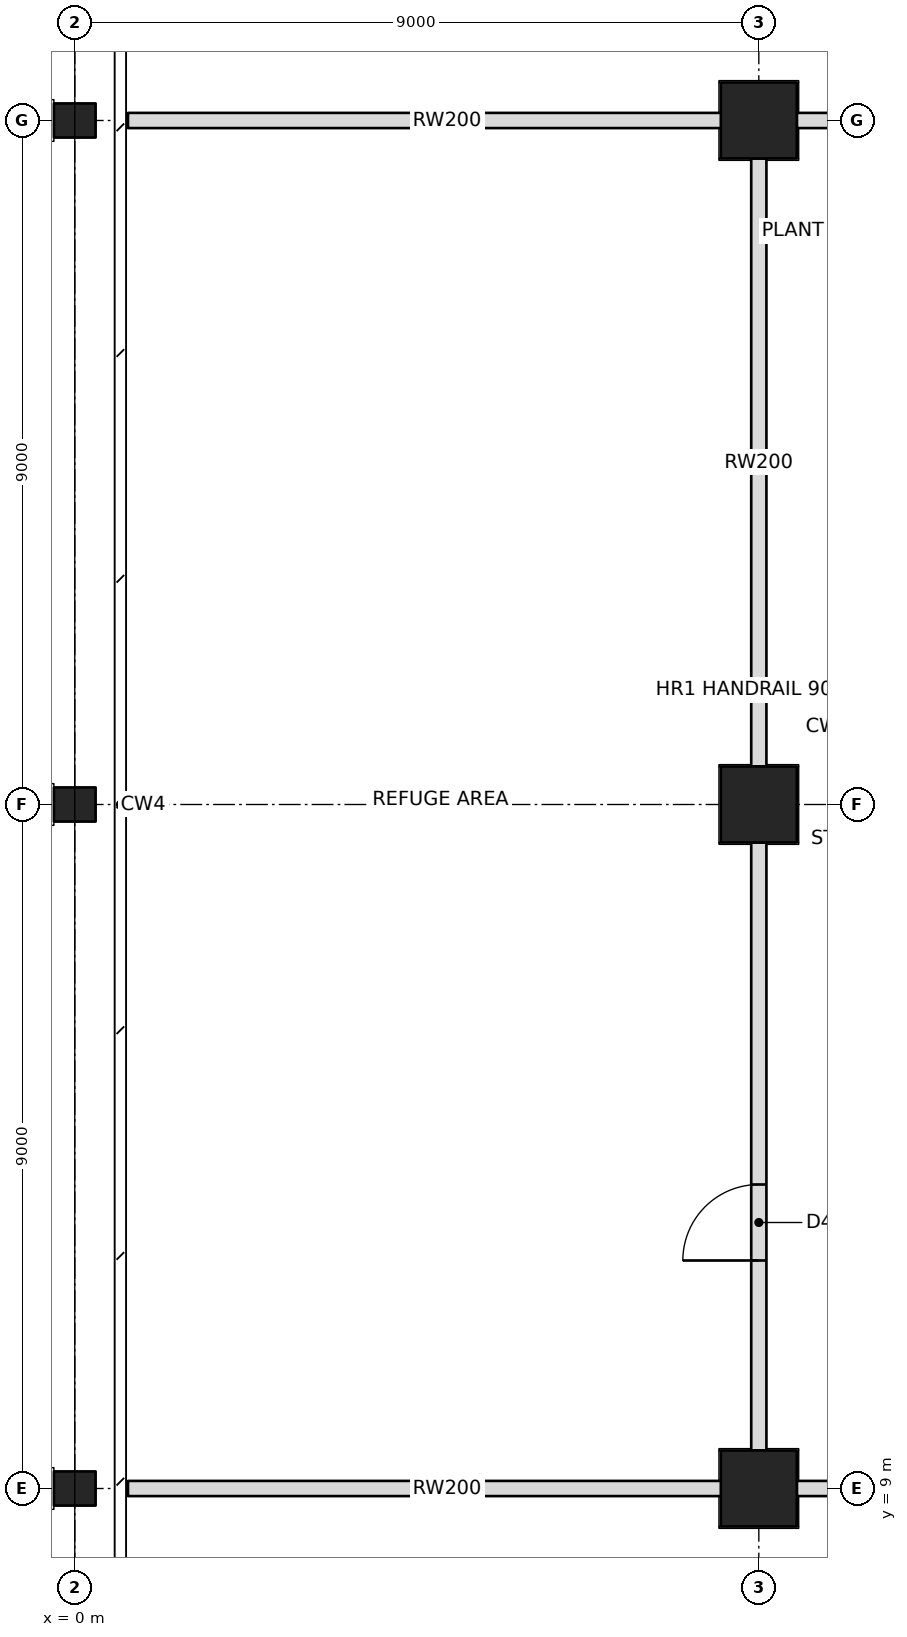
"""IFC4 building model, lengths in metres.
Left out: names, types, materials, properties, quantities, classifications, styles, units other than length and angle.
Written with IfcOpenShell. Run it as: python <this file> out.ifc"""

import sys

from ifc_helpers import new_model, si_unit, direction, frame, frame_2d, origin, origin_2d, place, context, subcontext, project, spatial, rectangle, hollow_rectangle, i_section, extrude, element, fill, save


model = new_model("IFC4")
c1 = context("Model", 3, precision=1e-05, world=origin(), true_north=direction((0.0, 1.0)))
c2 = subcontext(c1, "Body", "Model", "MODEL_VIEW")
j1 = project(units=[si_unit("LENGTHUNIT", "METRE"), si_unit("PLANEANGLEUNIT", "RADIAN")], contexts=[c1])
p1 = place(None, origin())
s1 = spatial("IfcSite", under=j1, at=p1, CompositionType="ELEMENT")
p2 = place(p1, origin())
s2 = spatial("IfcBuilding", under=s1, at=p2, CompositionType="ELEMENT")
p3 = place(p2, frame((0.0, 0.0, 89.2)))
s3 = spatial("IfcBuildingStorey", under=s2, at=p3, CompositionType="ELEMENT", Elevation=89.2)
for number, where, z_axis, x_axis in (
    (1, (0.0, 9.0, 0.0), (0.0, 0.0, 1.0), (0.0, 1.0, 0.0)),
    (2, (0.0, 18.0, 0.0), (0.0, 0.0, 1.0), (0.0, 1.0, 0.0)),
    (3, (0.0, 27.0, 0.0), (0.0, 0.0, 1.0), (0.0, 1.0, 0.0)),
):
    element("IfcColumn", number, at=place(p3, frame(where, z_axis=z_axis, x_axis=x_axis)), inside=s3, PredefinedType="COLUMN", context=c2, shape_type="SweptSolid", body=[
        extrude(i_section(OverallWidth=0.449, OverallDepth=0.549, WebThickness=0.072, FlangeThickness=0.115, at=origin_2d()), origin(), (0.0, 0.0, 1.0), 5.0),
    ])
for number, where, z_axis, x_axis in (
    (4, (9.0, 9.0, 0.0), (0.0, 0.0, 1.0), (1.0, 0.0, 0.0)),
    (5, (9.0, 18.0, 0.0), (0.0, 0.0, 1.0), (1.0, 0.0, 0.0)),
    (6, (9.0, 27.0, 0.0), (0.0, 0.0, 1.0), (1.0, 0.0, 0.0)),
):
    element("IfcColumn", number, at=place(p3, frame(where, z_axis=z_axis, x_axis=x_axis)), inside=s3, PredefinedType="COLUMN", context=c2, shape_type="SweptSolid", body=[
        extrude(hollow_rectangle(XDim=1.0, YDim=1.0, WallThickness=0.1, at=origin_2d()), origin(), (0.0, 0.0, 1.0), 5.0),
    ])
p4 = place(p3, frame((9.0, 9.5, 0.0), z_axis=(0.0, 0.0, 1.0), x_axis=(0.0, 1.0, 0.0)))
e7 = element("IfcWall", 7, at=p4, inside=s3, PredefinedType="PARTITIONING", context=c2, shape_type="SweptSolid", body=[
    extrude(rectangle(XDim=8.0, YDim=0.2, at=frame_2d((4.0, 0.0))), origin(), (0.0, 0.0, 1.0), 4.005),
])
p5 = place(p4, frame((2.5, 0.0, 0.0)))
e8 = element("IfcOpeningElement", 8, at=p5, cuts=e7, PredefinedType="OPENING", context=c2, shape_type="SweptSolid", body=[
    extrude(rectangle(XDim=1.0, YDim=2.1, at=frame_2d((0.5, 1.05))), frame((0.0, 0.11, 0.0), z_axis=(0.0, -1.0, 0.0), x_axis=(1.0, 0.0, 0.0)), (0.0, 0.0, 1.0), 0.22),
])
p6 = place(p3, frame((9.0, 18.5, 0.0), z_axis=(0.0, 0.0, 1.0), x_axis=(0.0, 1.0, 0.0)))
e9 = element("IfcWall", 9, at=p6, inside=s3, PredefinedType="PARTITIONING", context=c2, shape_type="SweptSolid", body=[
    extrude(rectangle(XDim=8.0, YDim=0.2, at=frame_2d((4.0, 0.0))), origin(), (0.0, 0.0, 1.0), 4.005),
])
for number, where, z_axis, x_axis in (
    (10, (0.7, 9.0, 0.0), (0.0, 0.0, 1.0), (1.0, 0.0, 0.0)),
    (11, (0.7, 27.0, 0.0), (0.0, 0.0, 1.0), (1.0, 0.0, 0.0)),
):
    element("IfcWall", number, at=place(p3, frame(where, z_axis=z_axis, x_axis=x_axis)), inside=s3, PredefinedType="PARTITIONING", context=c2, shape_type="SweptSolid", body=[
        extrude(rectangle(XDim=8.4, YDim=0.2, at=frame_2d((4.2, 0.0))), origin(), (0.0, 0.0, 1.0), 4.005),
    ])
p7 = place(p3, frame((9.5, 9.0, 0.0), z_axis=(0.0, 0.0, 1.0), x_axis=(1.0, 0.0, 0.0)))
e12 = element("IfcWall", 12, at=p7, inside=s3, PredefinedType="PARTITIONING", context=c2, shape_type="SweptSolid", body=[
    extrude(rectangle(XDim=8.0, YDim=0.2, at=frame_2d((4.0, 0.0))), origin(), (0.0, 0.0, 1.0), 4.005),
])
p8 = place(p7, frame((1.5, 0.0, 0.0)))
e13 = element("IfcOpeningElement", 13, at=p8, cuts=e12, PredefinedType="OPENING", context=c2, shape_type="SweptSolid", body=[
    extrude(rectangle(XDim=1.0, YDim=2.1, at=frame_2d((0.5, 1.05))), frame((0.0, 0.11, 0.0), z_axis=(0.0, -1.0, 0.0), x_axis=(1.0, 0.0, 0.0)), (0.0, 0.0, 1.0), 0.22),
])
p9 = place(p3, frame((9.5, 27.0, 0.0), z_axis=(0.0, 0.0, 1.0), x_axis=(1.0, 0.0, 0.0)))
e14 = element("IfcWall", 14, at=p9, inside=s3, PredefinedType="PARTITIONING", context=c2, shape_type="SweptSolid", body=[
    extrude(rectangle(XDim=8.0, YDim=0.2, at=frame_2d((4.0, 0.0))), origin(), (0.0, 0.0, 1.0), 4.005),
])
p10 = place(p9, frame((1.5, 0.0, 0.0)))
e15 = element("IfcOpeningElement", 15, at=p10, cuts=e14, PredefinedType="OPENING", context=c2, shape_type="SweptSolid", body=[
    extrude(rectangle(XDim=1.0, YDim=2.1, at=frame_2d((0.5, 1.05))), frame((0.0, 0.11, 0.0), z_axis=(0.0, -1.0, 0.0), x_axis=(1.0, 0.0, 0.0)), (0.0, 0.0, 1.0), 0.22),
])
p11 = place(p5, origin())
e16 = element("IfcDoor", 16, at=p11, inside=s3, OperationType="SINGLE_SWING_LEFT", PredefinedType="DOOR", context=c2, shape_type="SweptSolid", body=[
    extrude(rectangle(XDim=1.0, YDim=2.1, at=frame_2d((0.5, 1.05))), frame((0.0, 0.025, 0.0), z_axis=(0.0, -1.0, 0.0), x_axis=(1.0, 0.0, 0.0)), (0.0, 0.0, 1.0), 0.05),
])
fill(e8, e16)
save(model, sys.argv[1])
